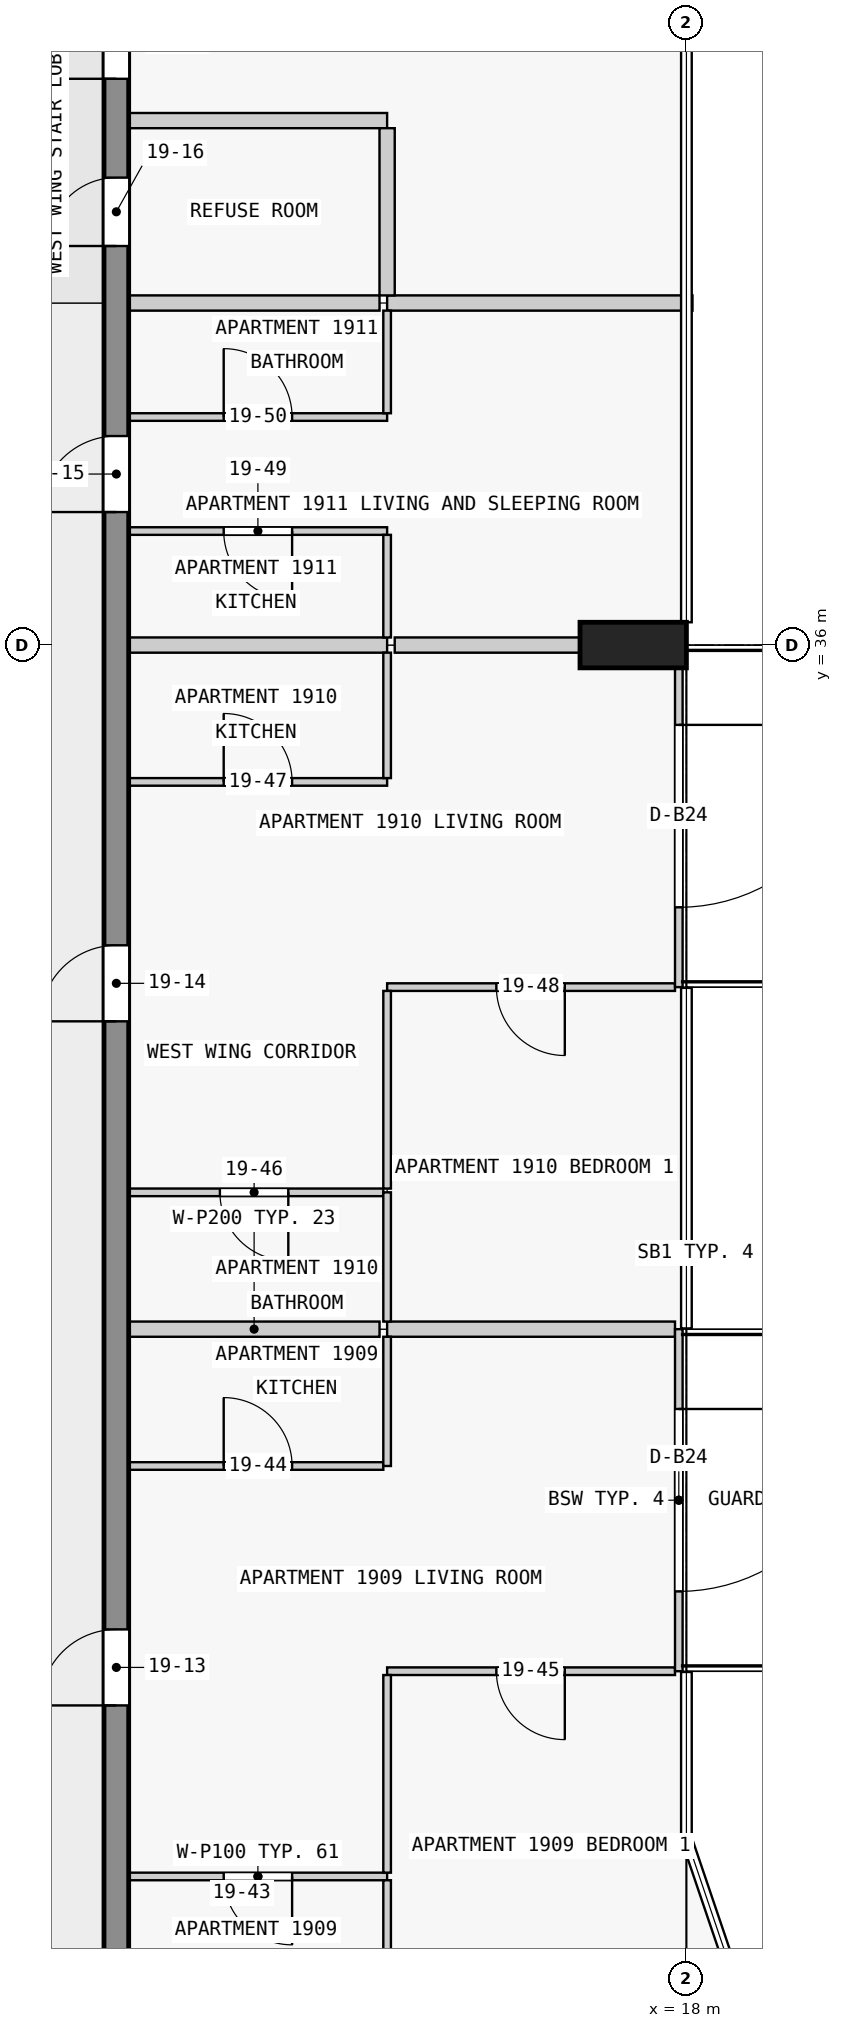
"""IFC4 building model, lengths in metres.
Left out: names, types, materials, properties, quantities, classifications, styles, units other than length and angle.
Written with IfcOpenShell. Run it as: python <this file> out.ifc"""

import sys

from ifc_helpers import new_model, si_unit, direction, frame, frame_2d, origin, origin_2d, place, context, subcontext, project, spatial, rectangle, extrude, element, fill, save


model = new_model("IFC4")
c1 = context("Model", 3, precision=1e-05, world=origin(), true_north=direction((0.0, 1.0)))
c2 = subcontext(c1, "Body", "Model", "MODEL_VIEW")
j1 = project(units=[si_unit("LENGTHUNIT", "METRE"), si_unit("PLANEANGLEUNIT", "RADIAN")], contexts=[c1])
p1 = place(None, origin())
s1 = spatial("IfcSite", under=j1, at=p1, CompositionType="ELEMENT")
p2 = place(p1, origin())
s2 = spatial("IfcBuilding", under=s1, at=p2, CompositionType="ELEMENT")
p3 = place(p2, frame((0.0, 0.0, 78.3)))
s3 = spatial("IfcBuildingStorey", under=s2, at=p3, CompositionType="ELEMENT", Elevation=78.3)
p4 = place(p3, frame((17.3, 36.0, 0.0), z_axis=(0.0, 0.0, 1.0), x_axis=(0.0, 1.0, 0.0)))
e1 = element("IfcColumn", 1, at=p4, inside=s3, PredefinedType="COLUMN", context=c2, shape_type="SweptSolid", body=[
    extrude(rectangle(XDim=0.6, YDim=1.4, at=origin_2d()), origin(), (0.0, 0.0, 1.0), 3.5),
])
p5 = place(p3, frame((10.5, 18.0, 0.0), z_axis=(0.0, 0.0, 1.0), x_axis=(0.0, 1.0, 0.0)))
e2 = element("IfcWall", 2, at=p5, inside=s3, PredefinedType="SHEAR", context=c2, shape_type="SweptSolid", body=[
    extrude(rectangle(XDim=27.0, YDim=0.325, at=frame_2d((13.5, 0.0))), origin(), (0.0, 0.0, 1.0), 3.25),
])
p6 = place(p5, frame((4.05, 0.0, 0.0)))
e3 = element("IfcOpeningElement", 3, at=p6, cuts=e2, PredefinedType="OPENING", context=c2, shape_type="SweptSolid", body=[
    extrude(rectangle(XDim=1.0, YDim=2.1, at=frame_2d((0.5, 1.05))), frame((0.0, 0.172, 0.0), z_axis=(0.0, -1.0, 0.0), x_axis=(1.0, 0.0, 0.0)), (0.0, 0.0, 1.0), 0.345),
])
p7 = place(p5, frame((13.05, 0.0, 0.0)))
e4 = element("IfcOpeningElement", 4, at=p7, cuts=e2, PredefinedType="OPENING", context=c2, shape_type="SweptSolid", body=[
    extrude(rectangle(XDim=1.0, YDim=2.1, at=frame_2d((0.5, 1.05))), frame((0.0, 0.172, 0.0), z_axis=(0.0, -1.0, 0.0), x_axis=(1.0, 0.0, 0.0)), (0.0, 0.0, 1.0), 0.345),
])
p8 = place(p5, frame((19.75, 0.0, 0.0)))
e5 = element("IfcOpeningElement", 5, at=p8, cuts=e2, PredefinedType="OPENING", context=c2, shape_type="SweptSolid", body=[
    extrude(rectangle(XDim=1.0, YDim=2.1, at=frame_2d((0.5, 1.05))), frame((0.0, 0.172, 0.0), z_axis=(0.0, -1.0, 0.0), x_axis=(1.0, 0.0, 0.0)), (0.0, 0.0, 1.0), 0.345),
])
p9 = place(p5, frame((23.25, 0.0, 0.0)))
e6 = element("IfcOpeningElement", 6, at=p9, cuts=e2, PredefinedType="OPENING", context=c2, shape_type="SweptSolid", body=[
    extrude(rectangle(XDim=0.9, YDim=2.1, at=frame_2d((0.45, 1.05))), frame((0.0, 0.172, 0.0), z_axis=(0.0, -1.0, 0.0), x_axis=(1.0, 0.0, 0.0)), (0.0, 0.0, 1.0), 0.345),
])
p10 = place(p5, frame((25.45, 0.0, 0.0)))
e7 = element("IfcOpeningElement", 7, at=p10, cuts=e2, PredefinedType="OPENING", context=c2, shape_type="SweptSolid", body=[
    extrude(rectangle(XDim=1.0, YDim=2.1, at=frame_2d((0.5, 1.05))), frame((0.0, 0.172, 0.0), z_axis=(0.0, -1.0, 0.0), x_axis=(1.0, 0.0, 0.0)), (0.0, 0.0, 1.0), 0.345),
])
p11 = place(p3, frame((17.9, 27.0, 0.0), z_axis=(0.0, 0.0, 1.0), x_axis=(0.0, -1.0, 0.0)))
e8 = element("IfcWall", 8, at=p11, inside=s3, PredefinedType="STANDARD", context=c2, shape_type="SweptSolid", body=[
    extrude(rectangle(XDim=4.5, YDim=0.1, at=frame_2d((2.25, 0.0))), origin(), (0.0, 0.0, 1.0), 3.25),
])
p12 = place(p11, frame((1.05, 0.0, 0.0)))
e9 = element("IfcOpeningElement", 9, at=p12, cuts=e8, PredefinedType="OPENING", context=c2, shape_type="SweptSolid", body=[
    extrude(rectangle(XDim=2.4, YDim=2.4, at=frame_2d((1.2, 1.2))), frame((0.0, 0.06, 0.0), z_axis=(0.0, -1.0, 0.0), x_axis=(1.0, 0.0, 0.0)), (0.0, 0.0, 1.0), 0.12),
])
p13 = place(p3, frame((17.9, 36.0, 0.0), z_axis=(0.0, 0.0, 1.0), x_axis=(0.0, -1.0, 0.0)))
e10 = element("IfcWall", 10, at=p13, inside=s3, PredefinedType="STANDARD", context=c2, shape_type="SweptSolid", body=[
    extrude(rectangle(XDim=4.5, YDim=0.1, at=frame_2d((2.25, 0.0))), origin(), (0.0, 0.0, 1.0), 3.25),
])
p14 = place(p13, frame((1.05, 0.0, 0.0)))
e11 = element("IfcOpeningElement", 11, at=p14, cuts=e10, PredefinedType="OPENING", context=c2, shape_type="SweptSolid", body=[
    extrude(rectangle(XDim=2.4, YDim=2.4, at=frame_2d((1.2, 1.2))), frame((0.0, 0.06, 0.0), z_axis=(0.0, -1.0, 0.0), x_axis=(1.0, 0.0, 0.0)), (0.0, 0.0, 1.0), 0.12),
])
p15 = place(p3, frame((14.062, 19.8, 0.0), z_axis=(0.0, 0.0, 1.0), x_axis=(-1.0, 0.0, 0.0)))
e12 = element("IfcWall", 12, at=p15, inside=s3, PredefinedType="PARTITIONING", context=c2, shape_type="SweptSolid", body=[
    extrude(rectangle(XDim=3.4, YDim=0.1, at=frame_2d((1.7, 0.0))), origin(), (0.0, 0.0, 1.0), 3.25),
])
p16 = place(p15, frame((1.25, 0.0, 0.0)))
e13 = element("IfcOpeningElement", 13, at=p16, cuts=e12, PredefinedType="OPENING", context=c2, shape_type="SweptSolid", body=[
    extrude(rectangle(XDim=0.9, YDim=2.1, at=frame_2d((0.45, 1.05))), frame((0.0, 0.06, 0.0), z_axis=(0.0, -1.0, 0.0), x_axis=(1.0, 0.0, 0.0)), (0.0, 0.0, 1.0), 0.12),
])
p17 = place(p3, frame((17.85, 22.5, 0.0), z_axis=(0.0, 0.0, 1.0), x_axis=(-1.0, 0.0, 0.0)))
e14 = element("IfcWall", 14, at=p17, inside=s3, PredefinedType="PARTITIONING", context=c2, shape_type="SweptSolid", body=[
    extrude(rectangle(XDim=3.788, YDim=0.1, at=frame_2d((1.894, 0.0))), origin(), (0.0, 0.0, 1.0), 3.25),
])
p18 = place(p17, frame((1.45, 0.0, 0.0)))
e15 = element("IfcOpeningElement", 15, at=p18, cuts=e14, PredefinedType="OPENING", context=c2, shape_type="SweptSolid", body=[
    extrude(rectangle(XDim=0.9, YDim=2.1, at=frame_2d((0.45, 1.05))), frame((0.0, 0.06, 0.0), z_axis=(0.0, -1.0, 0.0), x_axis=(1.0, 0.0, 0.0)), (0.0, 0.0, 1.0), 0.12),
])
p19 = place(p3, frame((10.663, 25.2, 0.0), z_axis=(0.0, 0.0, 1.0), x_axis=(1.0, 0.0, 0.0)))
e16 = element("IfcWall", 16, at=p19, inside=s3, PredefinedType="PARTITIONING", context=c2, shape_type="SweptSolid", body=[
    extrude(rectangle(XDim=3.35, YDim=0.1, at=frame_2d((1.675, 0.0))), origin(), (0.0, 0.0, 1.0), 3.25),
])
p20 = place(p19, frame((1.25, 0.0, 0.0)))
e17 = element("IfcOpeningElement", 17, at=p20, cuts=e16, PredefinedType="OPENING", context=c2, shape_type="SweptSolid", body=[
    extrude(rectangle(XDim=0.9, YDim=2.1, at=frame_2d((0.45, 1.05))), frame((0.0, 0.06, 0.0), z_axis=(0.0, -1.0, 0.0), x_axis=(1.0, 0.0, 0.0)), (0.0, 0.0, 1.0), 0.12),
])
p21 = place(p3, frame((13.962, 27.0, 0.0), z_axis=(0.0, 0.0, 1.0), x_axis=(-1.0, 0.0, 0.0)))
e18 = element("IfcWall", 18, at=p21, inside=s3, PredefinedType="PARTITIONING", context=c2, shape_type="SweptSolid", body=[
    extrude(rectangle(XDim=3.3, YDim=0.2, at=frame_2d((1.65, 0.0))), origin(), (0.0, 0.0, 1.0), 3.25),
])
p22 = place(p3, frame((14.062, 27.0, 0.0), z_axis=(0.0, 0.0, 1.0), x_axis=(1.0, 0.0, 0.0)))
e19 = element("IfcWall", 19, at=p22, inside=s3, PredefinedType="PARTITIONING", context=c2, shape_type="SweptSolid", body=[
    extrude(rectangle(XDim=3.788, YDim=0.2, at=frame_2d((1.894, 0.0))), origin(), (0.0, 0.0, 1.0), 3.25),
])
p23 = place(p3, frame((14.012, 28.8, 0.0), z_axis=(0.0, 0.0, 1.0), x_axis=(-1.0, 0.0, 0.0)))
e20 = element("IfcWall", 20, at=p23, inside=s3, PredefinedType="PARTITIONING", context=c2, shape_type="SweptSolid", body=[
    extrude(rectangle(XDim=3.35, YDim=0.1, at=frame_2d((1.675, 0.0))), origin(), (0.0, 0.0, 1.0), 3.25),
])
p24 = place(p23, frame((1.25, 0.0, 0.0)))
e21 = element("IfcOpeningElement", 21, at=p24, cuts=e20, PredefinedType="OPENING", context=c2, shape_type="SweptSolid", body=[
    extrude(rectangle(XDim=0.9, YDim=2.1, at=frame_2d((0.45, 1.05))), frame((0.0, 0.06, 0.0), z_axis=(0.0, -1.0, 0.0), x_axis=(1.0, 0.0, 0.0)), (0.0, 0.0, 1.0), 0.12),
])
p25 = place(p3, frame((17.85, 31.5, 0.0), z_axis=(0.0, 0.0, 1.0), x_axis=(-1.0, 0.0, 0.0)))
e22 = element("IfcWall", 22, at=p25, inside=s3, PredefinedType="PARTITIONING", context=c2, shape_type="SweptSolid", body=[
    extrude(rectangle(XDim=3.788, YDim=0.1, at=frame_2d((1.894, 0.0))), origin(), (0.0, 0.0, 1.0), 3.25),
])
p26 = place(p25, frame((1.45, 0.0, 0.0)))
e23 = element("IfcOpeningElement", 23, at=p26, cuts=e22, PredefinedType="OPENING", context=c2, shape_type="SweptSolid", body=[
    extrude(rectangle(XDim=0.9, YDim=2.1, at=frame_2d((0.45, 1.05))), frame((0.0, 0.06, 0.0), z_axis=(0.0, -1.0, 0.0), x_axis=(1.0, 0.0, 0.0)), (0.0, 0.0, 1.0), 0.12),
])
p27 = place(p3, frame((10.663, 34.2, 0.0), z_axis=(0.0, 0.0, 1.0), x_axis=(1.0, 0.0, 0.0)))
e24 = element("IfcWall", 24, at=p27, inside=s3, PredefinedType="PARTITIONING", context=c2, shape_type="SweptSolid", body=[
    extrude(rectangle(XDim=3.4, YDim=0.1, at=frame_2d((1.7, 0.0))), origin(), (0.0, 0.0, 1.0), 3.25),
])
p28 = place(p27, frame((1.25, 0.0, 0.0)))
e25 = element("IfcOpeningElement", 25, at=p28, cuts=e24, PredefinedType="OPENING", context=c2, shape_type="SweptSolid", body=[
    extrude(rectangle(XDim=0.9, YDim=2.1, at=frame_2d((0.45, 1.05))), frame((0.0, 0.06, 0.0), z_axis=(0.0, -1.0, 0.0), x_axis=(1.0, 0.0, 0.0)), (0.0, 0.0, 1.0), 0.12),
])
p29 = place(p3, frame((14.062, 36.0, 0.0), z_axis=(0.0, 0.0, 1.0), x_axis=(-1.0, 0.0, 0.0)))
e26 = element("IfcWall", 26, at=p29, inside=s3, PredefinedType="PARTITIONING", context=c2, shape_type="SweptSolid", body=[
    extrude(rectangle(XDim=3.4, YDim=0.2, at=frame_2d((1.7, 0.0))), origin(), (0.0, 0.0, 1.0), 3.25),
])
p30 = place(p3, frame((14.163, 36.0, 0.0), z_axis=(0.0, 0.0, 1.0), x_axis=(1.0, 0.0, 0.0)))
e27 = element("IfcWall", 27, at=p30, inside=s3, PredefinedType="PARTITIONING", context=c2, shape_type="SweptSolid", body=[
    extrude(rectangle(XDim=2.438, YDim=0.2, at=frame_2d((1.219, 0.0))), origin(), (0.0, 0.0, 1.0), 3.25),
])
p31 = place(p3, frame((14.062, 37.5, 0.0), z_axis=(0.0, 0.0, 1.0), x_axis=(-1.0, 0.0, 0.0)))
e28 = element("IfcWall", 28, at=p31, inside=s3, PredefinedType="PARTITIONING", context=c2, shape_type="SweptSolid", body=[
    extrude(rectangle(XDim=3.4, YDim=0.1, at=frame_2d((1.7, 0.0))), origin(), (0.0, 0.0, 1.0), 3.25),
])
p32 = place(p31, frame((1.25, 0.0, 0.0)))
e29 = element("IfcOpeningElement", 29, at=p32, cuts=e28, PredefinedType="OPENING", context=c2, shape_type="SweptSolid", body=[
    extrude(rectangle(XDim=0.9, YDim=2.1, at=frame_2d((0.45, 1.05))), frame((0.0, 0.06, 0.0), z_axis=(0.0, -1.0, 0.0), x_axis=(1.0, 0.0, 0.0)), (0.0, 0.0, 1.0), 0.12),
])
p33 = place(p3, frame((10.663, 39.0, 0.0), z_axis=(0.0, 0.0, 1.0), x_axis=(1.0, 0.0, 0.0)))
e30 = element("IfcWall", 30, at=p33, inside=s3, PredefinedType="PARTITIONING", context=c2, shape_type="SweptSolid", body=[
    extrude(rectangle(XDim=3.4, YDim=0.1, at=frame_2d((1.7, 0.0))), origin(), (0.0, 0.0, 1.0), 3.25),
])
p34 = place(p33, frame((1.25, 0.0, 0.0)))
e31 = element("IfcOpeningElement", 31, at=p34, cuts=e30, PredefinedType="OPENING", context=c2, shape_type="SweptSolid", body=[
    extrude(rectangle(XDim=0.9, YDim=2.1, at=frame_2d((0.45, 1.05))), frame((0.0, 0.06, 0.0), z_axis=(0.0, -1.0, 0.0), x_axis=(1.0, 0.0, 0.0)), (0.0, 0.0, 1.0), 0.12),
])
p35 = place(p3, frame((13.962, 40.5, 0.0), z_axis=(0.0, 0.0, 1.0), x_axis=(-1.0, 0.0, 0.0)))
e32 = element("IfcWall", 32, at=p35, inside=s3, PredefinedType="PARTITIONING", context=c2, shape_type="SweptSolid", body=[
    extrude(rectangle(XDim=3.3, YDim=0.2, at=frame_2d((1.65, 0.0))), origin(), (0.0, 0.0, 1.0), 3.25),
])
p36 = place(p3, frame((14.062, 40.5, 0.0), z_axis=(0.0, 0.0, 1.0), x_axis=(1.0, 0.0, 0.0)))
e33 = element("IfcWall", 33, at=p36, inside=s3, PredefinedType="PARTITIONING", context=c2, shape_type="SweptSolid", body=[
    extrude(rectangle(XDim=4.018, YDim=0.2, at=frame_2d((2.009, 0.0))), origin(), (0.0, 0.0, 1.0), 3.25),
])
p37 = place(p3, frame((14.062, 42.9, 0.0), z_axis=(0.0, 0.0, 1.0), x_axis=(-1.0, 0.0, 0.0)))
e34 = element("IfcWall", 34, at=p37, inside=s3, PredefinedType="PARTITIONING", context=c2, shape_type="SweptSolid", body=[
    extrude(rectangle(XDim=3.4, YDim=0.2, at=frame_2d((1.7, 0.0))), origin(), (0.0, 0.0, 1.0), 3.25),
])
for number, where, z_axis, x_axis in (
    (35, (14.062, 22.45, 0.0), (0.0, 0.0, 1.0), (0.0, -1.0, 0.0)),
    (36, (14.062, 31.45, 0.0), (0.0, 0.0, 1.0), (0.0, -1.0, 0.0)),
):
    element("IfcWall", number, at=place(p3, frame(where, z_axis=z_axis, x_axis=x_axis)), inside=s3, PredefinedType="PARTITIONING", context=c2, shape_type="SweptSolid", body=[
        extrude(rectangle(XDim=2.6, YDim=0.1, at=frame_2d((1.3, 0.0))), origin(), (0.0, 0.0, 1.0), 3.25),
    ])
p38 = place(p3, frame((14.062, 18.0, 0.0), z_axis=(0.0, 0.0, 1.0), x_axis=(0.0, 1.0, 0.0)))
e37 = element("IfcWall", 37, at=p38, inside=s3, PredefinedType="PARTITIONING", context=c2, shape_type="SweptSolid", body=[
    extrude(rectangle(XDim=1.75, YDim=0.1, at=frame_2d((0.875, 0.0))), origin(), (0.0, 0.0, 1.0), 3.25),
])
for number, where, z_axis, x_axis in (
    (38, (14.062, 25.2, 0.0), (0.0, 0.0, 1.0), (0.0, 1.0, 0.0)),
    (39, (14.062, 27.1, 0.0), (0.0, 0.0, 1.0), (0.0, 1.0, 0.0)),
):
    element("IfcWall", number, at=place(p3, frame(where, z_axis=z_axis, x_axis=x_axis)), inside=s3, PredefinedType="PARTITIONING", context=c2, shape_type="SweptSolid", body=[
        extrude(rectangle(XDim=1.7, YDim=0.1, at=frame_2d((0.85, 0.0))), origin(), (0.0, 0.0, 1.0), 3.25),
    ])
p39 = place(p3, frame((14.062, 34.25, 0.0), z_axis=(0.0, 0.0, 1.0), x_axis=(0.0, 1.0, 0.0)))
e40 = element("IfcWall", 40, at=p39, inside=s3, PredefinedType="PARTITIONING", context=c2, shape_type="SweptSolid", body=[
    extrude(rectangle(XDim=1.65, YDim=0.1, at=frame_2d((0.825, 0.0))), origin(), (0.0, 0.0, 1.0), 3.25),
])
for number, where, z_axis, x_axis in (
    (41, (14.062, 36.1, 0.0), (0.0, 0.0, 1.0), (0.0, 1.0, 0.0)),
    (42, (14.062, 39.05, 0.0), (0.0, 0.0, 1.0), (0.0, 1.0, 0.0)),
):
    element("IfcWall", number, at=place(p3, frame(where, z_axis=z_axis, x_axis=x_axis)), inside=s3, PredefinedType="PARTITIONING", context=c2, shape_type="SweptSolid", body=[
        extrude(rectangle(XDim=1.35, YDim=0.1, at=frame_2d((0.675, 0.0))), origin(), (0.0, 0.0, 1.0), 3.25),
    ])
p40 = place(p3, frame((14.062, 40.6, 0.0), z_axis=(0.0, 0.0, 1.0), x_axis=(0.0, 1.0, 0.0)))
e43 = element("IfcWall", 43, at=p40, inside=s3, PredefinedType="PARTITIONING", context=c2, shape_type="SweptSolid", body=[
    extrude(rectangle(XDim=2.2, YDim=0.2, at=frame_2d((1.1, 0.0))), origin(), (0.0, 0.0, 1.0), 3.25),
])
p41 = place(p12, origin())
e44 = element("IfcDoor", 44, at=p41, inside=s3, OperationType="SINGLE_SWING_LEFT", PredefinedType="DOOR", context=c2, shape_type="SweptSolid", body=[
    extrude(rectangle(XDim=2.4, YDim=2.4, at=frame_2d((1.2, 1.2))), frame((0.0, 0.025, 0.0), z_axis=(0.0, -1.0, 0.0), x_axis=(1.0, 0.0, 0.0)), (0.0, 0.0, 1.0), 0.05),
])
fill(e9, e44)
p42 = place(p14, origin())
e45 = element("IfcDoor", 45, at=p42, inside=s3, OperationType="SINGLE_SWING_LEFT", PredefinedType="DOOR", context=c2, shape_type="SweptSolid", body=[
    extrude(rectangle(XDim=2.4, YDim=2.4, at=frame_2d((1.2, 1.2))), frame((0.0, 0.025, 0.0), z_axis=(0.0, -1.0, 0.0), x_axis=(1.0, 0.0, 0.0)), (0.0, 0.0, 1.0), 0.05),
])
fill(e11, e45)
p43 = place(p6, origin())
e46 = element("IfcDoor", 46, at=p43, inside=s3, OperationType="SINGLE_SWING_LEFT", PredefinedType="DOOR", context=c2, shape_type="SweptSolid", body=[
    extrude(rectangle(XDim=1.0, YDim=2.1, at=frame_2d((0.5, 1.05))), frame((0.0, 0.025, 0.0), z_axis=(0.0, -1.0, 0.0), x_axis=(1.0, 0.0, 0.0)), (0.0, 0.0, 1.0), 0.05),
])
fill(e3, e46)
p44 = place(p7, origin())
e47 = element("IfcDoor", 47, at=p44, inside=s3, OperationType="SINGLE_SWING_RIGHT", PredefinedType="DOOR", context=c2, shape_type="SweptSolid", body=[
    extrude(rectangle(XDim=1.0, YDim=2.1, at=frame_2d((0.5, 1.05))), frame((0.0, 0.025, 0.0), z_axis=(0.0, -1.0, 0.0), x_axis=(1.0, 0.0, 0.0)), (0.0, 0.0, 1.0), 0.05),
])
fill(e4, e47)
p45 = place(p8, origin())
e48 = element("IfcDoor", 48, at=p45, inside=s3, OperationType="SINGLE_SWING_RIGHT", PredefinedType="DOOR", context=c2, shape_type="SweptSolid", body=[
    extrude(rectangle(XDim=1.0, YDim=2.1, at=frame_2d((0.5, 1.05))), frame((0.0, 0.025, 0.0), z_axis=(0.0, -1.0, 0.0), x_axis=(1.0, 0.0, 0.0)), (0.0, 0.0, 1.0), 0.05),
])
fill(e5, e48)
p46 = place(p9, origin())
e49 = element("IfcDoor", 49, at=p46, inside=s3, OperationType="SINGLE_SWING_RIGHT", PredefinedType="DOOR", context=c2, shape_type="SweptSolid", body=[
    extrude(rectangle(XDim=0.9, YDim=2.1, at=frame_2d((0.45, 1.05))), frame((0.0, 0.025, 0.0), z_axis=(0.0, -1.0, 0.0), x_axis=(1.0, 0.0, 0.0)), (0.0, 0.0, 1.0), 0.05),
])
fill(e6, e49)
p47 = place(p10, origin())
e50 = element("IfcDoor", 50, at=p47, inside=s3, OperationType="SINGLE_SWING_RIGHT", PredefinedType="DOOR", context=c2, shape_type="SweptSolid", body=[
    extrude(rectangle(XDim=1.0, YDim=2.1, at=frame_2d((0.5, 1.05))), frame((0.0, 0.025, 0.0), z_axis=(0.0, -1.0, 0.0), x_axis=(1.0, 0.0, 0.0)), (0.0, 0.0, 1.0), 0.05),
])
fill(e7, e50)
p48 = place(p16, origin())
e51 = element("IfcDoor", 51, at=p48, inside=s3, OperationType="SINGLE_SWING_LEFT", PredefinedType="DOOR", context=c2, shape_type="SweptSolid", body=[
    extrude(rectangle(XDim=0.9, YDim=2.1, at=frame_2d((0.45, 1.05))), frame((0.0, 0.025, 0.0), z_axis=(0.0, -1.0, 0.0), x_axis=(1.0, 0.0, 0.0)), (0.0, 0.0, 1.0), 0.05),
])
fill(e13, e51)
p49 = place(p20, origin())
e52 = element("IfcDoor", 52, at=p49, inside=s3, OperationType="SINGLE_SWING_RIGHT", PredefinedType="DOOR", context=c2, shape_type="SweptSolid", body=[
    extrude(rectangle(XDim=0.9, YDim=2.1, at=frame_2d((0.45, 1.05))), frame((0.0, 0.025, 0.0), z_axis=(0.0, -1.0, 0.0), x_axis=(1.0, 0.0, 0.0)), (0.0, 0.0, 1.0), 0.05),
])
fill(e17, e52)
p50 = place(p18, origin())
e53 = element("IfcDoor", 53, at=p50, inside=s3, OperationType="SINGLE_SWING_RIGHT", PredefinedType="DOOR", context=c2, shape_type="SweptSolid", body=[
    extrude(rectangle(XDim=0.9, YDim=2.1, at=frame_2d((0.45, 1.05))), frame((0.0, 0.025, 0.0), z_axis=(0.0, -1.0, 0.0), x_axis=(1.0, 0.0, 0.0)), (0.0, 0.0, 1.0), 0.05),
])
fill(e15, e53)
p51 = place(p24, origin())
e54 = element("IfcDoor", 54, at=p51, inside=s3, OperationType="SINGLE_SWING_RIGHT", PredefinedType="DOOR", context=c2, shape_type="SweptSolid", body=[
    extrude(rectangle(XDim=0.9, YDim=2.1, at=frame_2d((0.45, 1.05))), frame((0.0, 0.025, 0.0), z_axis=(0.0, -1.0, 0.0), x_axis=(1.0, 0.0, 0.0)), (0.0, 0.0, 1.0), 0.05),
])
fill(e21, e54)
p52 = place(p28, origin())
e55 = element("IfcDoor", 55, at=p52, inside=s3, OperationType="SINGLE_SWING_LEFT", PredefinedType="DOOR", context=c2, shape_type="SweptSolid", body=[
    extrude(rectangle(XDim=0.9, YDim=2.1, at=frame_2d((0.45, 1.05))), frame((0.0, 0.025, 0.0), z_axis=(0.0, -1.0, 0.0), x_axis=(1.0, 0.0, 0.0)), (0.0, 0.0, 1.0), 0.05),
])
fill(e25, e55)
p53 = place(p26, origin())
e56 = element("IfcDoor", 56, at=p53, inside=s3, OperationType="SINGLE_SWING_RIGHT", PredefinedType="DOOR", context=c2, shape_type="SweptSolid", body=[
    extrude(rectangle(XDim=0.9, YDim=2.1, at=frame_2d((0.45, 1.05))), frame((0.0, 0.025, 0.0), z_axis=(0.0, -1.0, 0.0), x_axis=(1.0, 0.0, 0.0)), (0.0, 0.0, 1.0), 0.05),
])
fill(e23, e56)
p54 = place(p32, origin())
e57 = element("IfcDoor", 57, at=p54, inside=s3, OperationType="SINGLE_SWING_LEFT", PredefinedType="DOOR", context=c2, shape_type="SweptSolid", body=[
    extrude(rectangle(XDim=0.9, YDim=2.1, at=frame_2d((0.45, 1.05))), frame((0.0, 0.025, 0.0), z_axis=(0.0, -1.0, 0.0), x_axis=(1.0, 0.0, 0.0)), (0.0, 0.0, 1.0), 0.05),
])
fill(e29, e57)
p55 = place(p34, origin())
e58 = element("IfcDoor", 58, at=p55, inside=s3, OperationType="SINGLE_SWING_LEFT", PredefinedType="DOOR", context=c2, shape_type="SweptSolid", body=[
    extrude(rectangle(XDim=0.9, YDim=2.1, at=frame_2d((0.45, 1.05))), frame((0.0, 0.025, 0.0), z_axis=(0.0, -1.0, 0.0), x_axis=(1.0, 0.0, 0.0)), (0.0, 0.0, 1.0), 0.05),
])
fill(e31, e58)
save(model, sys.argv[1])
